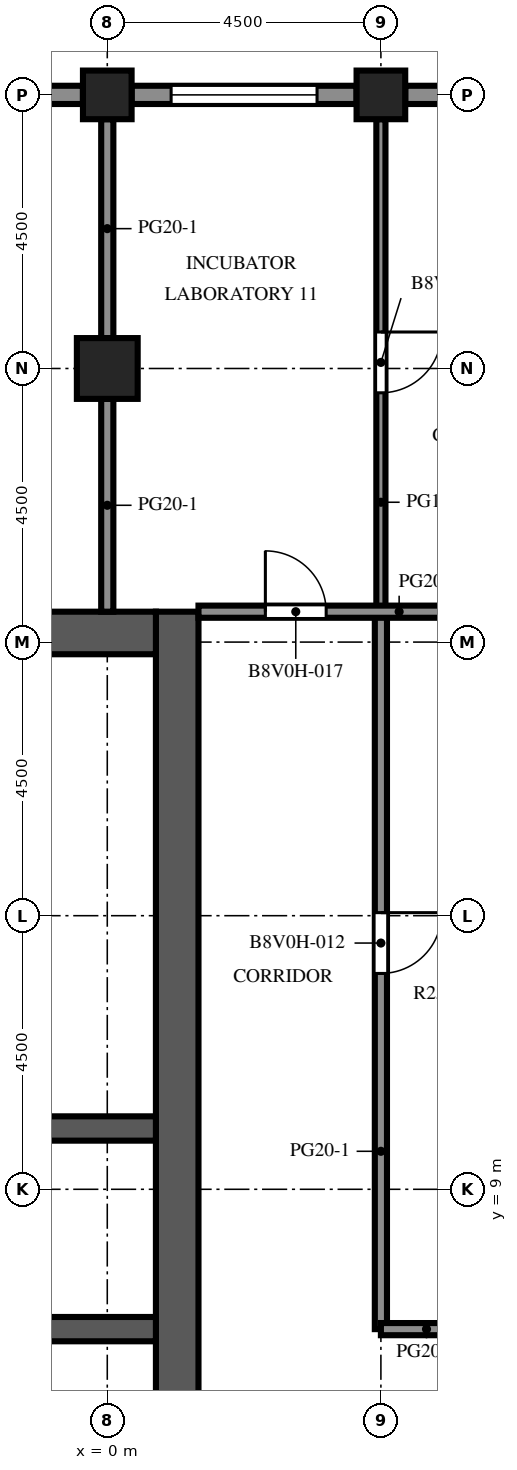
"""IFC4 building model, lengths in metres.
Left out: names, types, materials, properties, quantities, classifications, styles, units other than length and angle.
Written with IfcOpenShell. Run it as: python <this file> out.ifc"""

import sys

from ifc_helpers import new_model, si_unit, direction, frame, frame_2d, origin, origin_2d, place, context, subcontext, project, spatial, rectangle, extrude, element, fill, save


model = new_model("IFC4")
c1 = context("Model", 3, precision=1e-05, world=origin(), true_north=direction((0.0, 1.0)))
c2 = subcontext(c1, "Body", "Model", "MODEL_VIEW")
j1 = project(units=[si_unit("LENGTHUNIT", "METRE"), si_unit("PLANEANGLEUNIT", "RADIAN")], contexts=[c1])
p1 = place(None, origin())
s1 = spatial("IfcSite", under=j1, at=p1, CompositionType="ELEMENT")
p2 = place(p1, origin())
s2 = spatial("IfcBuilding", under=s1, at=p2, CompositionType="ELEMENT")
p3 = place(p2, frame((0.0, 0.0, 266.3)))
s3 = spatial("IfcBuildingStorey", under=s2, at=p3, CompositionType="ELEMENT", Elevation=266.3)
for number, where, z_axis, x_axis in (
    (1, (0.0, 27.0, -0.45), (0.0, 0.0, 1.0), (1.0, 0.0, 0.0)),
    (2, (4.5, 27.0, -0.45), (0.0, 0.0, 1.0), (1.0, 0.0, 0.0)),
):
    element("IfcColumn", number, at=place(p3, frame(where, z_axis=z_axis, x_axis=x_axis)), inside=s3, PredefinedType="COLUMN", context=c2, shape_type="SweptSolid", body=[
        extrude(rectangle(XDim=0.8, YDim=0.8, at=origin_2d()), origin(), (0.0, 0.0, 1.0), 4.55),
    ])
p4 = place(p3, frame((0.0, 22.5, 0.0), z_axis=(0.0, 0.0, 1.0), x_axis=(1.0, 0.0, 0.0)))
e3 = element("IfcColumn", 3, at=p4, inside=s3, PredefinedType="COLUMN", context=c2, shape_type="SweptSolid", body=[
    extrude(rectangle(XDim=1.0, YDim=1.0, at=origin_2d()), origin(), (0.0, 0.0, 1.0), 4.1),
])
p5 = place(p3, frame((1.15, -9.0, 0.0), z_axis=(0.0, 0.0, 1.0), x_axis=(0.0, 1.0, 0.0)))
e4 = element("IfcWall", 4, at=p5, inside=s3, PredefinedType="SHEAR", context=c2, shape_type="SweptSolid", body=[
    extrude(rectangle(XDim=27.5, YDim=0.7, at=frame_2d((13.75, 0.0))), origin(), (0.0, 0.0, 1.0), 4.1),
])
p6 = place(p5, frame((12.55, 0.0, 0.0)))
e5 = element("IfcOpeningElement", 5, at=p6, cuts=e4, PredefinedType="OPENING", context=c2, shape_type="SweptSolid", body=[
    extrude(rectangle(XDim=2.4, YDim=2.4, at=frame_2d((1.2, 1.2))), frame((0.0, 0.36, 0.0), z_axis=(0.0, -1.0, 0.0), x_axis=(1.0, 0.0, 0.0)), (0.0, 0.0, 1.0), 0.72),
])
p7 = place(p5, frame((3.788, 0.0, 0.0)))
e6 = element("IfcOpeningElement", 6, at=p7, cuts=e4, PredefinedType="OPENING", context=c2, shape_type="SweptSolid", body=[
    extrude(rectangle(XDim=0.968, YDim=2.1, at=frame_2d((0.484, 1.05))), frame((0.0, 0.36, 0.0), z_axis=(0.0, -1.0, 0.0), x_axis=(1.0, 0.0, 0.0)), (0.0, 0.0, 1.0), 0.72),
])
p8 = place(p5, frame((23.54, 0.0, 0.0)))
e7 = element("IfcOpeningElement", 7, at=p8, cuts=e4, PredefinedType="OPENING", context=c2, shape_type="SweptSolid", body=[
    extrude(rectangle(XDim=1.2, YDim=2.1, at=frame_2d((0.6, 1.05))), frame((0.0, 0.36, 0.0), z_axis=(0.0, -1.0, 0.0), x_axis=(1.0, 0.0, 0.0)), (0.0, 0.0, 1.0), 0.72),
])
p9 = place(p3, frame((-9.8, 18.15, 0.0), z_axis=(0.0, 0.0, 1.0), x_axis=(1.0, 0.0, 0.0)))
e8 = element("IfcWall", 8, at=p9, inside=s3, PredefinedType="SHEAR", context=c2, shape_type="SweptSolid", body=[
    extrude(rectangle(XDim=10.6, YDim=0.7, at=frame_2d((5.3, 0.0))), origin(), (0.0, 0.0, 1.0), 4.1),
])
p10 = place(p3, frame((-9.8, 6.7, 0.0), z_axis=(0.0, 0.0, 1.0), x_axis=(1.0, 0.0, 0.0)))
e9 = element("IfcWall", 9, at=p10, inside=s3, PredefinedType="SHEAR", context=c2, shape_type="SweptSolid", body=[
    extrude(rectangle(XDim=10.6, YDim=0.4, at=frame_2d((5.3, 0.0))), origin(), (0.0, 0.0, 1.0), 4.1),
])
p11 = place(p10, frame((3.438, 0.0, 0.0)))
e10 = element("IfcOpeningElement", 10, at=p11, cuts=e9, PredefinedType="OPENING", context=c2, shape_type="SweptSolid", body=[
    extrude(rectangle(XDim=1.1, YDim=2.1, at=frame_2d((0.55, 1.05))), frame((0.0, 0.21, 0.0), z_axis=(0.0, -1.0, 0.0), x_axis=(1.0, 0.0, 0.0)), (0.0, 0.0, 1.0), 0.42),
])
p12 = place(p10, frame((6.062, 0.0, 0.0)))
e11 = element("IfcOpeningElement", 11, at=p12, cuts=e9, PredefinedType="OPENING", context=c2, shape_type="SweptSolid", body=[
    extrude(rectangle(XDim=1.1, YDim=2.1, at=frame_2d((0.55, 1.05))), frame((0.0, 0.21, 0.0), z_axis=(0.0, -1.0, 0.0), x_axis=(1.0, 0.0, 0.0)), (0.0, 0.0, 1.0), 0.42),
])
p13 = place(p10, frame((8.812, 0.0, 0.0)))
e12 = element("IfcOpeningElement", 12, at=p13, cuts=e9, PredefinedType="OPENING", context=c2, shape_type="SweptSolid", body=[
    extrude(rectangle(XDim=1.1, YDim=2.1, at=frame_2d((0.55, 1.05))), frame((0.0, 0.21, 0.0), z_axis=(0.0, -1.0, 0.0), x_axis=(1.0, 0.0, 0.0)), (0.0, 0.0, 1.0), 0.42),
])
p14 = place(p10, frame((0.738, 0.0, 0.0)))
e13 = element("IfcOpeningElement", 13, at=p14, cuts=e9, PredefinedType="OPENING", context=c2, shape_type="SweptSolid", body=[
    extrude(rectangle(XDim=1.0, YDim=2.1, at=frame_2d((0.5, 1.05))), frame((0.0, 0.21, 0.0), z_axis=(0.0, -1.0, 0.0), x_axis=(1.0, 0.0, 0.0)), (0.0, 0.0, 1.0), 0.42),
])
p15 = place(p3, frame((-9.8, 10.0, 0.0), z_axis=(0.0, 0.0, 1.0), x_axis=(1.0, 0.0, 0.0)))
e14 = element("IfcWall", 14, at=p15, inside=s3, PredefinedType="SHEAR", context=c2, shape_type="SweptSolid", body=[
    extrude(rectangle(XDim=10.6, YDim=0.4, at=frame_2d((5.3, 0.0))), origin(), (0.0, 0.0, 1.0), 4.1),
])
p16 = place(p3, frame((4.9, 27.0, 0.0), z_axis=(0.0, 0.0, 1.0), x_axis=(1.0, 0.0, 0.0)))
e15 = element("IfcWall", 15, at=p16, inside=s3, PredefinedType="SOLIDWALL", context=c2, shape_type="SweptSolid", body=[
    extrude(rectangle(XDim=3.7, YDim=0.3, at=frame_2d((1.85, 0.0))), origin(), (0.0, 0.0, 1.0), 2.85),
])
p17 = place(p16, frame((0.65, 0.0, 0.8)))
e16 = element("IfcOpeningElement", 16, at=p17, cuts=e15, PredefinedType="OPENING", context=c2, shape_type="SweptSolid", body=[
    extrude(rectangle(XDim=2.4, YDim=1.7, at=frame_2d((1.2, 0.85))), frame((0.0, 0.16, 0.0), z_axis=(0.0, -1.0, 0.0), x_axis=(1.0, 0.0, 0.0)), (0.0, 0.0, 1.0), 0.32),
])
p18 = place(p3, frame((0.4, 27.0, 0.0), z_axis=(0.0, 0.0, 1.0), x_axis=(1.0, 0.0, 0.0)))
e17 = element("IfcWall", 17, at=p18, inside=s3, PredefinedType="SOLIDWALL", context=c2, shape_type="SweptSolid", body=[
    extrude(rectangle(XDim=3.7, YDim=0.3, at=frame_2d((1.85, 0.0))), origin(), (0.0, 0.0, 1.0), 2.85),
])
p19 = place(p18, frame((0.65, 0.0, 0.8)))
e18 = element("IfcOpeningElement", 18, at=p19, cuts=e17, PredefinedType="OPENING", context=c2, shape_type="SweptSolid", body=[
    extrude(rectangle(XDim=2.4, YDim=1.7, at=frame_2d((1.2, 0.85))), frame((0.0, 0.16, 0.0), z_axis=(0.0, -1.0, 0.0), x_axis=(1.0, 0.0, 0.0)), (0.0, 0.0, 1.0), 0.32),
])
p20 = place(p3, frame((-4.1, 27.0, 0.0), z_axis=(0.0, 0.0, 1.0), x_axis=(1.0, 0.0, 0.0)))
e19 = element("IfcWall", 19, at=p20, inside=s3, PredefinedType="SOLIDWALL", context=c2, shape_type="SweptSolid", body=[
    extrude(rectangle(XDim=3.7, YDim=0.3, at=frame_2d((1.85, 0.0))), origin(), (0.0, 0.0, 1.0), 2.85),
])
p21 = place(p20, frame((0.65, 0.0, 0.8)))
e20 = element("IfcOpeningElement", 20, at=p21, cuts=e19, PredefinedType="OPENING", context=c2, shape_type="SweptSolid", body=[
    extrude(rectangle(XDim=2.4, YDim=1.7, at=frame_2d((1.2, 0.85))), frame((0.0, 0.16, 0.0), z_axis=(0.0, -1.0, 0.0), x_axis=(1.0, 0.0, 0.0)), (0.0, 0.0, 1.0), 0.32),
])
p22 = place(p3, frame((-0.5, 12.48, 0.0), z_axis=(0.0, 0.0, 1.0), x_axis=(1.0, 0.0, 0.0)))
e21 = element("IfcWall", 21, at=p22, inside=s3, PredefinedType="PARTITIONING", context=c2, shape_type="SweptSolid", body=[
    extrude(rectangle(XDim=1.3, YDim=0.1, at=frame_2d((0.65, 0.0))), origin(), (0.0, 0.0, 1.0), 3.65),
])
p23 = place(p22, frame((0.2, 0.0, 0.0)))
e22 = element("IfcOpeningElement", 22, at=p23, cuts=e21, PredefinedType="OPENING", context=c2, shape_type="SweptSolid", body=[
    extrude(rectangle(XDim=0.9, YDim=2.1, at=frame_2d((0.45, 1.05))), frame((0.0, 0.06, 0.0), z_axis=(0.0, -1.0, 0.0), x_axis=(1.0, 0.0, 0.0)), (0.0, 0.0, 1.0), 0.12),
])
p24 = place(p3, frame((-4.3, 12.48, 0.0), z_axis=(0.0, 0.0, 1.0), x_axis=(1.0, 0.0, 0.0)))
e23 = element("IfcWall", 23, at=p24, inside=s3, PredefinedType="PARTITIONING", context=c2, shape_type="SweptSolid", body=[
    extrude(rectangle(XDim=3.8, YDim=0.1, at=frame_2d((1.9, 0.0))), origin(), (0.0, 0.0, 1.0), 3.65),
])
p25 = place(p3, frame((-0.5, 12.48, 0.0), z_axis=(0.0, 0.0, 1.0), x_axis=(0.0, 1.0, 0.0)))
e24 = element("IfcWall", 24, at=p25, inside=s3, PredefinedType="PARTITIONING", context=c2, shape_type="SweptSolid", body=[
    extrude(rectangle(XDim=2.66, YDim=0.1, at=frame_2d((1.33, 0.0))), origin(), (0.0, 0.0, 1.0), 3.65),
])
p26 = place(p25, frame((0.83, 0.0, 0.0)))
e25 = element("IfcOpeningElement", 25, at=p26, cuts=e24, PredefinedType="OPENING", context=c2, shape_type="SweptSolid", body=[
    extrude(rectangle(XDim=1.0, YDim=2.1, at=frame_2d((0.5, 1.05))), frame((0.0, 0.06, 0.0), z_axis=(0.0, -1.0, 0.0), x_axis=(1.0, 0.0, 0.0)), (0.0, 0.0, 1.0), 0.12),
])
p27 = place(p3, frame((-0.5, 15.14, 0.0), z_axis=(0.0, 0.0, 1.0), x_axis=(0.0, 1.0, 0.0)))
e26 = element("IfcWall", 26, at=p27, inside=s3, PredefinedType="PARTITIONING", context=c2, shape_type="SweptSolid", body=[
    extrude(rectangle(XDim=2.66, YDim=0.1, at=frame_2d((1.33, 0.0))), origin(), (0.0, 0.0, 1.0), 3.65),
])
p28 = place(p27, frame((0.83, 0.0, 0.0)))
e27 = element("IfcOpeningElement", 27, at=p28, cuts=e26, PredefinedType="OPENING", context=c2, shape_type="SweptSolid", body=[
    extrude(rectangle(XDim=1.0, YDim=2.1, at=frame_2d((0.5, 1.05))), frame((0.0, 0.06, 0.0), z_axis=(0.0, -1.0, 0.0), x_axis=(1.0, 0.0, 0.0)), (0.0, 0.0, 1.0), 0.12),
])
p29 = place(p3, frame((-4.3, 15.14, 0.0), z_axis=(0.0, 0.0, 1.0), x_axis=(1.0, 0.0, 0.0)))
e28 = element("IfcWall", 28, at=p29, inside=s3, PredefinedType="PARTITIONING", context=c2, shape_type="SweptSolid", body=[
    extrude(rectangle(XDim=3.8, YDim=0.1, at=frame_2d((1.9, 0.0))), origin(), (0.0, 0.0, 1.0), 3.65),
])
p30 = place(p3, frame((0.0, 18.5, 0.0), z_axis=(0.0, 0.0, 1.0), x_axis=(0.0, 1.0, 0.0)))
e29 = element("IfcWall", 29, at=p30, inside=s3, PredefinedType="PARTITIONING", context=c2, shape_type="SweptSolid", body=[
    extrude(rectangle(XDim=3.5, YDim=0.2, at=frame_2d((1.75, 0.0))), origin(), (0.0, 0.0, 1.0), 3.65),
])
p31 = place(p3, frame((0.0, 23.0, 0.0), z_axis=(0.0, 0.0, 1.0), x_axis=(0.0, 1.0, 0.0)))
e30 = element("IfcWall", 30, at=p31, inside=s3, PredefinedType="PARTITIONING", context=c2, shape_type="SweptSolid", body=[
    extrude(rectangle(XDim=3.6, YDim=0.2, at=frame_2d((1.8, 0.0))), origin(), (0.0, 0.0, 1.0), 3.65),
])
p32 = place(p3, frame((4.5, 26.6, 0.0), z_axis=(0.0, 0.0, 1.0), x_axis=(0.0, -1.0, 0.0)))
e31 = element("IfcWall", 31, at=p32, inside=s3, PredefinedType="PARTITIONING", context=c2, shape_type="SweptSolid", body=[
    extrude(rectangle(XDim=8.1, YDim=0.15, at=frame_2d((4.05, 0.0))), origin(), (0.0, 0.0, 1.0), 3.65),
])
p33 = place(p32, frame((3.5, 0.0, 0.0)))
e32 = element("IfcOpeningElement", 32, at=p33, cuts=e31, PredefinedType="OPENING", context=c2, shape_type="SweptSolid", body=[
    extrude(rectangle(XDim=1.0, YDim=2.1, at=frame_2d((0.5, 1.05))), frame((0.0, 0.085, 0.0), z_axis=(0.0, -1.0, 0.0), x_axis=(1.0, 0.0, 0.0)), (0.0, 0.0, 1.0), 0.17),
])
p34 = place(p3, frame((4.5, 18.5, 0.0), z_axis=(0.0, 0.0, 1.0), x_axis=(0.0, -1.0, 0.0)))
e33 = element("IfcWall", 33, at=p34, inside=s3, PredefinedType="PARTITIONING", context=c2, shape_type="SweptSolid", body=[
    extrude(rectangle(XDim=11.8, YDim=0.2, at=frame_2d((5.9, 0.0))), origin(), (0.0, 0.0, 1.0), 3.65),
])
p35 = place(p34, frame((4.95, 0.0, 0.0)))
e34 = element("IfcOpeningElement", 34, at=p35, cuts=e33, PredefinedType="OPENING", context=c2, shape_type="SweptSolid", body=[
    extrude(rectangle(XDim=1.0, YDim=2.1, at=frame_2d((0.5, 1.05))), frame((0.0, 0.11, 0.0), z_axis=(0.0, -1.0, 0.0), x_axis=(1.0, 0.0, 0.0)), (0.0, 0.0, 1.0), 0.22),
])
p36 = place(p3, frame((4.5, 6.7, 0.0), z_axis=(0.0, 0.0, 1.0), x_axis=(1.0, 0.0, 0.0)))
e35 = element("IfcWall", 35, at=p36, inside=s3, PredefinedType="PARTITIONING", context=c2, shape_type="SweptSolid", body=[
    extrude(rectangle(XDim=1.5, YDim=0.2, at=frame_2d((0.75, 0.0))), origin(), (0.0, 0.0, 1.0), 3.65),
])
p37 = place(p3, frame((1.5, 18.5, 0.0), z_axis=(0.0, 0.0, 1.0), x_axis=(1.0, 0.0, 0.0)))
e36 = element("IfcWall", 36, at=p37, inside=s3, PredefinedType="PARTITIONING", context=c2, shape_type="SweptSolid", body=[
    extrude(rectangle(XDim=4.5, YDim=0.2, at=frame_2d((2.25, 0.0))), origin(), (0.0, 0.0, 1.0), 3.65),
])
p38 = place(p37, frame((1.1, 0.0, 0.0)))
e37 = element("IfcOpeningElement", 37, at=p38, cuts=e36, PredefinedType="OPENING", context=c2, shape_type="SweptSolid", body=[
    extrude(rectangle(XDim=1.0, YDim=2.1, at=frame_2d((0.5, 1.05))), frame((0.0, 0.11, 0.0), z_axis=(0.0, -1.0, 0.0), x_axis=(1.0, 0.0, 0.0)), (0.0, 0.0, 1.0), 0.22),
])
p39 = place(p19, origin())
e38 = element("IfcWindow", 38, at=p39, inside=s3, PartitioningType="SINGLE_PANEL", PredefinedType="WINDOW", context=c2, shape_type="SweptSolid", body=[
    extrude(rectangle(XDim=2.4, YDim=1.7, at=frame_2d((1.2, 0.85))), frame((0.0, 0.03, 0.0), z_axis=(0.0, -1.0, 0.0), x_axis=(1.0, 0.0, 0.0)), (0.0, 0.0, 1.0), 0.06),
])
fill(e18, e38)
p40 = place(p13, origin())
e39 = element("IfcDoor", 39, at=p40, inside=s3, OperationType="DOUBLE_DOOR_SLIDING", PredefinedType="DOOR", context=c2, shape_type="SweptSolid", body=[
    extrude(rectangle(XDim=1.1, YDim=2.1, at=frame_2d((0.55, 1.05))), frame((0.0, 0.025, 0.0), z_axis=(0.0, -1.0, 0.0), x_axis=(1.0, 0.0, 0.0)), (0.0, 0.0, 1.0), 0.05),
])
fill(e12, e39)
p41 = place(p6, origin())
e40 = element("IfcDoor", 40, at=p41, inside=s3, OperationType="DOUBLE_DOOR_DOUBLE_SWING", PredefinedType="DOOR", context=c2, shape_type="SweptSolid", body=[
    extrude(rectangle(XDim=2.4, YDim=2.4, at=frame_2d((1.2, 1.2))), frame((0.0, 0.025, 0.0), z_axis=(0.0, -1.0, 0.0), x_axis=(1.0, 0.0, 0.0)), (0.0, 0.0, 1.0), 0.05),
])
fill(e5, e40)
p42 = place(p23, origin())
e41 = element("IfcDoor", 41, at=p42, inside=s3, OperationType="SINGLE_SWING_LEFT", PredefinedType="DOOR", context=c2, shape_type="SweptSolid", body=[
    extrude(rectangle(XDim=0.9, YDim=2.1, at=frame_2d((0.45, 1.05))), frame((0.0, 0.025, 0.0), z_axis=(0.0, -1.0, 0.0), x_axis=(1.0, 0.0, 0.0)), (0.0, 0.0, 1.0), 0.05),
])
fill(e22, e41)
p43 = place(p8, origin())
e42 = element("IfcDoor", 42, at=p43, inside=s3, OperationType="SINGLE_SWING_RIGHT", PredefinedType="DOOR", context=c2, shape_type="SweptSolid", body=[
    extrude(rectangle(XDim=1.2, YDim=2.1, at=frame_2d((0.6, 1.05))), frame((0.0, 0.325, 0.0), z_axis=(0.0, -1.0, 0.0), x_axis=(1.0, 0.0, 0.0)), (0.0, 0.0, 1.0), 0.05),
])
fill(e7, e42)
p44 = place(p26, origin())
e43 = element("IfcDoor", 43, at=p44, inside=s3, OperationType="SINGLE_SWING_LEFT", PredefinedType="DOOR", context=c2, shape_type="SweptSolid", body=[
    extrude(rectangle(XDim=1.0, YDim=2.1, at=frame_2d((0.5, 1.05))), frame((0.0, 0.025, 0.0), z_axis=(0.0, -1.0, 0.0), x_axis=(1.0, 0.0, 0.0)), (0.0, 0.0, 1.0), 0.05),
])
fill(e25, e43)
p45 = place(p28, origin())
e44 = element("IfcDoor", 44, at=p45, inside=s3, OperationType="SINGLE_SWING_RIGHT", PredefinedType="DOOR", context=c2, shape_type="SweptSolid", body=[
    extrude(rectangle(XDim=1.0, YDim=2.1, at=frame_2d((0.5, 1.05))), frame((0.0, 0.025, 0.0), z_axis=(0.0, -1.0, 0.0), x_axis=(1.0, 0.0, 0.0)), (0.0, 0.0, 1.0), 0.05),
])
fill(e27, e44)
p46 = place(p35, origin())
e45 = element("IfcDoor", 45, at=p46, inside=s3, OperationType="SINGLE_SWING_LEFT", PredefinedType="DOOR", context=c2, shape_type="SweptSolid", body=[
    extrude(rectangle(XDim=1.0, YDim=2.1, at=frame_2d((0.5, 1.05))), frame((0.0, 0.025, 0.0), z_axis=(0.0, -1.0, 0.0), x_axis=(1.0, 0.0, 0.0)), (0.0, 0.0, 1.0), 0.05),
])
fill(e34, e45)
p47 = place(p33, origin())
e46 = element("IfcDoor", 46, at=p47, inside=s3, OperationType="SINGLE_SWING_LEFT", PredefinedType="DOOR", context=c2, shape_type="SweptSolid", body=[
    extrude(rectangle(XDim=1.0, YDim=2.1, at=frame_2d((0.5, 1.05))), frame((0.0, 0.025, 0.0), z_axis=(0.0, -1.0, 0.0), x_axis=(1.0, 0.0, 0.0)), (0.0, 0.0, 1.0), 0.05),
])
fill(e32, e46)
p48 = place(p38, origin())
e47 = element("IfcDoor", 47, at=p48, inside=s3, OperationType="SINGLE_SWING_LEFT", PredefinedType="DOOR", context=c2, shape_type="SweptSolid", body=[
    extrude(rectangle(XDim=1.0, YDim=2.1, at=frame_2d((0.5, 1.05))), frame((0.0, 0.025, 0.0), z_axis=(0.0, -1.0, 0.0), x_axis=(1.0, 0.0, 0.0)), (0.0, 0.0, 1.0), 0.05),
])
fill(e37, e47)
save(model, sys.argv[1])
